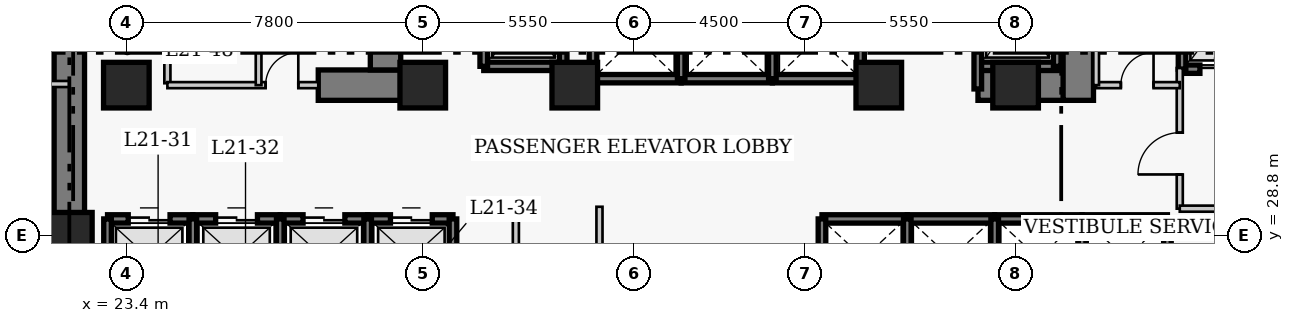
"""IFC4 building model, lengths in metres.
Left out: names, types, materials, properties, quantities, classifications, styles, units other than length and angle.
Written with IfcOpenShell. Run it as: python <this file> out.ifc"""

import sys

from ifc_helpers import new_model, si_unit, direction, frame, frame_2d, origin, origin_2d, place, context, subcontext, project, spatial, rectangle, extrude, element, fill, save


model = new_model("IFC4")
c1 = context("Model", 3, precision=1e-05, world=origin(), true_north=direction((0.0, 1.0)))
c2 = subcontext(c1, "Body", "Model", "MODEL_VIEW")
j1 = project(units=[si_unit("LENGTHUNIT", "METRE"), si_unit("PLANEANGLEUNIT", "RADIAN")], contexts=[c1])
p1 = place(None, origin())
s1 = spatial("IfcSite", under=j1, at=p1, CompositionType="ELEMENT")
p2 = place(p1, origin())
s2 = spatial("IfcBuilding", under=s1, at=p2, CompositionType="ELEMENT")
p3 = place(p2, frame((0.0, 0.0, 88.0)))
s3 = spatial("IfcBuildingStorey", under=s2, at=p3, CompositionType="ELEMENT", Elevation=88.0)
p4 = place(p3, frame((21.9, 27.05, 0.0), z_axis=(0.0, 0.0, 1.0), x_axis=(0.0, 1.0, 0.0)))
e1 = element("IfcWall", 1, at=p4, inside=s3, PredefinedType="SHEAR", context=c2, shape_type="SweptSolid", body=[
    extrude(rectangle(XDim=13.67, YDim=0.8, at=frame_2d((6.835, 0.0))), origin(), (0.0, 0.0, 1.0), 3.8),
])
p5 = place(p3, frame((28.45, 32.75, 0.0), z_axis=(0.0, 0.0, 1.0), x_axis=(1.0, 0.0, 0.0)))
e2 = element("IfcWall", 2, at=p5, inside=s3, PredefinedType="SHEAR", context=c2, shape_type="SweptSolid", body=[
    extrude(rectangle(XDim=2.4, YDim=0.8, at=frame_2d((1.2, 0.0))), origin(), (0.0, 0.0, 1.0), 3.8),
])
p6 = place(p3, frame((45.81, 32.75, 0.0), z_axis=(0.0, 0.0, 1.0), x_axis=(1.0, 0.0, 0.0)))
e3 = element("IfcWall", 3, at=p6, inside=s3, PredefinedType="SHEAR", context=c2, shape_type="SweptSolid", body=[
    extrude(rectangle(XDim=2.64, YDim=0.8, at=frame_2d((1.32, 0.0))), origin(), (0.0, 0.0, 1.0), 3.8),
])
p7 = place(p3, frame((30.22, 33.15, 0.0), z_axis=(0.0, 0.0, 1.0), x_axis=(0.0, 1.0, 0.0)))
e4 = element("IfcWall", 4, at=p7, inside=s3, PredefinedType="SHEAR", context=c2, shape_type="SweptSolid", body=[
    extrude(rectangle(XDim=7.17, YDim=0.8, at=frame_2d((3.585, 0.0))), origin(), (0.0, 0.0, 1.0), 3.8),
])
p8 = place(p3, frame((48.45, 32.35, 0.0), z_axis=(0.0, 0.0, 1.0), x_axis=(0.0, 1.0, 0.0)))
e5 = element("IfcWall", 5, at=p8, inside=s3, PredefinedType="SHEAR", context=c2, shape_type="SweptSolid", body=[
    extrude(rectangle(XDim=7.97, YDim=0.8, at=frame_2d((3.985, 0.0))), origin(), (0.0, 0.0, 1.0), 3.8),
])
p9 = place(p8, frame((5.85, 0.0, 0.0)))
e6 = element("IfcOpeningElement", 6, at=p9, cuts=e5, PredefinedType="OPENING", context=c2, shape_type="SweptSolid", body=[
    extrude(rectangle(XDim=1.1, YDim=2.15, at=frame_2d((0.55, 1.075))), frame((0.0, 0.41, 0.0), z_axis=(0.0, -1.0, 0.0), x_axis=(1.0, 0.0, 0.0)), (0.0, 0.0, 1.0), 0.82),
])
for number, where, z_axis, x_axis in (
    (7, (21.9, 28.8, 0.0), (0.0, 0.0, 1.0), (1.0, 0.0, 0.0)),
    (8, (23.4, 32.75, 0.0), (0.0, 0.0, 1.0), (1.0, 0.0, 0.0)),
    (9, (31.2, 32.75, 0.0), (0.0, 0.0, 1.0), (1.0, 0.0, 0.0)),
    (10, (35.2, 32.75, 0.0), (0.0, 0.0, 1.0), (1.0, 0.0, 0.0)),
    (11, (43.2, 32.75, 0.0), (0.0, 0.0, 1.0), (1.0, 0.0, 0.0)),
    (12, (46.8, 32.75, 0.0), (0.0, 0.0, 1.0), (1.0, 0.0, 0.0)),
):
    element("IfcColumn", number, at=place(p3, frame(where, z_axis=z_axis, x_axis=x_axis)), inside=s3, PredefinedType="COLUMN", context=c2, shape_type="SweptSolid", body=[
        extrude(rectangle(XDim=1.2, YDim=1.2, at=origin_2d()), origin(), (0.0, 0.0, 1.0), 3.8),
    ])
p10 = place(p3, frame((22.905, 29.23, 0.0), z_axis=(0.0, 0.0, 1.0), x_axis=(1.0, 0.0, 0.0)))
e13 = element("IfcWall", 13, at=p10, inside=s3, PredefinedType="SHEAR", context=c2, shape_type="SweptSolid", body=[
    extrude(rectangle(XDim=2.245, YDim=0.22, at=frame_2d((1.123, 0.0))), origin(), (0.0, 0.0, 1.0), 3.8),
])
p11 = place(p10, frame((0.545, 0.0, 0.0)))
e14 = element("IfcOpeningElement", 14, at=p11, cuts=e13, PredefinedType="OPENING", context=c2, shape_type="SweptSolid", body=[
    extrude(rectangle(XDim=1.1, YDim=2.15, at=frame_2d((0.55, 1.075))), frame((0.0, 0.12, 0.0), z_axis=(0.0, -1.0, 0.0), x_axis=(1.0, 0.0, 0.0)), (0.0, 0.0, 1.0), 0.24),
])
p12 = place(p3, frame((22.905, 27.17, 0.0), z_axis=(0.0, 0.0, 1.0), x_axis=(0.0, 1.0, 0.0)))
e15 = element("IfcWall", 15, at=p12, inside=s3, PredefinedType="SHEAR", context=c2, shape_type="SweptSolid", body=[
    extrude(rectangle(XDim=2.06, YDim=0.2, at=frame_2d((1.03, 0.0))), origin(), (0.0, 0.0, 1.0), 3.8),
])
p13 = place(p3, frame((25.15, 29.23, 0.0), z_axis=(0.0, 0.0, 1.0), x_axis=(1.0, 0.0, 0.0)))
e16 = element("IfcWall", 16, at=p13, inside=s3, PredefinedType="SHEAR", context=c2, shape_type="SweptSolid", body=[
    extrude(rectangle(XDim=2.3, YDim=0.22, at=frame_2d((1.15, 0.0))), origin(), (0.0, 0.0, 1.0), 3.8),
])
p14 = place(p13, frame((0.6, 0.0, 0.0)))
e17 = element("IfcOpeningElement", 17, at=p14, cuts=e16, PredefinedType="OPENING", context=c2, shape_type="SweptSolid", body=[
    extrude(rectangle(XDim=1.1, YDim=2.15, at=frame_2d((0.55, 1.075))), frame((0.0, 0.12, 0.0), z_axis=(0.0, -1.0, 0.0), x_axis=(1.0, 0.0, 0.0)), (0.0, 0.0, 1.0), 0.24),
])
p15 = place(p3, frame((25.15, 27.17, 0.0), z_axis=(0.0, 0.0, 1.0), x_axis=(0.0, 1.0, 0.0)))
e18 = element("IfcWall", 18, at=p15, inside=s3, PredefinedType="SHEAR", context=c2, shape_type="SweptSolid", body=[
    extrude(rectangle(XDim=2.06, YDim=0.2, at=frame_2d((1.03, 0.0))), origin(), (0.0, 0.0, 1.0), 3.8),
])
p16 = place(p3, frame((27.45, 29.23, 0.0), z_axis=(0.0, 0.0, 1.0), x_axis=(1.0, 0.0, 0.0)))
e19 = element("IfcWall", 19, at=p16, inside=s3, PredefinedType="SHEAR", context=c2, shape_type="SweptSolid", body=[
    extrude(rectangle(XDim=2.3, YDim=0.22, at=frame_2d((1.15, 0.0))), origin(), (0.0, 0.0, 1.0), 3.8),
])
p17 = place(p16, frame((0.6, 0.0, 0.0)))
e20 = element("IfcOpeningElement", 20, at=p17, cuts=e19, PredefinedType="OPENING", context=c2, shape_type="SweptSolid", body=[
    extrude(rectangle(XDim=1.1, YDim=2.15, at=frame_2d((0.55, 1.075))), frame((0.0, 0.12, 0.0), z_axis=(0.0, -1.0, 0.0), x_axis=(1.0, 0.0, 0.0)), (0.0, 0.0, 1.0), 0.24),
])
p18 = place(p3, frame((27.45, 27.17, 0.0), z_axis=(0.0, 0.0, 1.0), x_axis=(0.0, 1.0, 0.0)))
e21 = element("IfcWall", 21, at=p18, inside=s3, PredefinedType="SHEAR", context=c2, shape_type="SweptSolid", body=[
    extrude(rectangle(XDim=2.06, YDim=0.2, at=frame_2d((1.03, 0.0))), origin(), (0.0, 0.0, 1.0), 3.8),
])
p19 = place(p3, frame((29.75, 29.23, 0.0), z_axis=(0.0, 0.0, 1.0), x_axis=(1.0, 0.0, 0.0)))
e22 = element("IfcWall", 22, at=p19, inside=s3, PredefinedType="SHEAR", context=c2, shape_type="SweptSolid", body=[
    extrude(rectangle(XDim=2.245, YDim=0.22, at=frame_2d((1.123, 0.0))), origin(), (0.0, 0.0, 1.0), 3.8),
])
p20 = place(p19, frame((0.6, 0.0, 0.0)))
e23 = element("IfcOpeningElement", 23, at=p20, cuts=e22, PredefinedType="OPENING", context=c2, shape_type="SweptSolid", body=[
    extrude(rectangle(XDim=1.1, YDim=2.15, at=frame_2d((0.55, 1.075))), frame((0.0, 0.12, 0.0), z_axis=(0.0, -1.0, 0.0), x_axis=(1.0, 0.0, 0.0)), (0.0, 0.0, 1.0), 0.24),
])
for number, where, z_axis, x_axis in (
    (24, (29.75, 27.17, 0.0), (0.0, 0.0, 1.0), (0.0, 1.0, 0.0)),
    (25, (31.995, 27.17, 0.0), (0.0, 0.0, 1.0), (0.0, 1.0, 0.0)),
):
    element("IfcWall", number, at=place(p3, frame(where, z_axis=z_axis, x_axis=x_axis)), inside=s3, PredefinedType="SHEAR", context=c2, shape_type="SweptSolid", body=[
        extrude(rectangle(XDim=2.06, YDim=0.2, at=frame_2d((1.03, 0.0))), origin(), (0.0, 0.0, 1.0), 3.8),
    ])
p21 = place(p3, frame((41.705, 29.23, 0.0), z_axis=(0.0, 0.0, 1.0), x_axis=(1.0, 0.0, 0.0)))
e26 = element("IfcWall", 26, at=p21, inside=s3, PredefinedType="SHEAR", context=c2, shape_type="SweptSolid", body=[
    extrude(rectangle(XDim=2.245, YDim=0.22, at=frame_2d((1.123, 0.0))), origin(), (0.0, 0.0, 1.0), 3.8),
])
p22 = place(p3, frame((41.705, 27.17, 0.0), z_axis=(0.0, 0.0, 1.0), x_axis=(0.0, 1.0, 0.0)))
e27 = element("IfcWall", 27, at=p22, inside=s3, PredefinedType="SHEAR", context=c2, shape_type="SweptSolid", body=[
    extrude(rectangle(XDim=2.06, YDim=0.2, at=frame_2d((1.03, 0.0))), origin(), (0.0, 0.0, 1.0), 3.8),
])
p23 = place(p3, frame((43.95, 29.23, 0.0), z_axis=(0.0, 0.0, 1.0), x_axis=(1.0, 0.0, 0.0)))
e28 = element("IfcWall", 28, at=p23, inside=s3, PredefinedType="SHEAR", context=c2, shape_type="SweptSolid", body=[
    extrude(rectangle(XDim=2.3, YDim=0.22, at=frame_2d((1.15, 0.0))), origin(), (0.0, 0.0, 1.0), 3.8),
])
p24 = place(p3, frame((43.95, 27.17, 0.0), z_axis=(0.0, 0.0, 1.0), x_axis=(0.0, 1.0, 0.0)))
e29 = element("IfcWall", 29, at=p24, inside=s3, PredefinedType="SHEAR", context=c2, shape_type="SweptSolid", body=[
    extrude(rectangle(XDim=2.06, YDim=0.2, at=frame_2d((1.03, 0.0))), origin(), (0.0, 0.0, 1.0), 3.8),
])
p25 = place(p3, frame((46.25, 29.23, 0.0), z_axis=(0.0, 0.0, 1.0), x_axis=(1.0, 0.0, 0.0)))
e30 = element("IfcWall", 30, at=p25, inside=s3, PredefinedType="SHEAR", context=c2, shape_type="SweptSolid", body=[
    extrude(rectangle(XDim=2.3, YDim=0.22, at=frame_2d((1.15, 0.0))), origin(), (0.0, 0.0, 1.0), 3.8),
])
p26 = place(p3, frame((46.25, 27.17, 0.0), z_axis=(0.0, 0.0, 1.0), x_axis=(0.0, 1.0, 0.0)))
e31 = element("IfcWall", 31, at=p26, inside=s3, PredefinedType="SHEAR", context=c2, shape_type="SweptSolid", body=[
    extrude(rectangle(XDim=2.06, YDim=0.2, at=frame_2d((1.03, 0.0))), origin(), (0.0, 0.0, 1.0), 3.8),
])
p27 = place(p3, frame((48.55, 29.23, 0.0), z_axis=(0.0, 0.0, 1.0), x_axis=(1.0, 0.0, 0.0)))
e32 = element("IfcWall", 32, at=p27, inside=s3, PredefinedType="SHEAR", context=c2, shape_type="SweptSolid", body=[
    extrude(rectangle(XDim=2.245, YDim=0.22, at=frame_2d((1.123, 0.0))), origin(), (0.0, 0.0, 1.0), 3.8),
])
for number, where, z_axis, x_axis in (
    (33, (48.55, 27.17, 0.0), (0.0, 0.0, 1.0), (0.0, 1.0, 0.0)),
    (34, (50.795, 27.17, 0.0), (0.0, 0.0, 1.0), (0.0, 1.0, 0.0)),
):
    element("IfcWall", number, at=place(p3, frame(where, z_axis=z_axis, x_axis=x_axis)), inside=s3, PredefinedType="SHEAR", context=c2, shape_type="SweptSolid", body=[
        extrude(rectangle(XDim=2.06, YDim=0.2, at=frame_2d((1.03, 0.0))), origin(), (0.0, 0.0, 1.0), 3.8),
    ])
p28 = place(p3, frame((35.68, 32.92, 0.0), z_axis=(0.0, 0.0, 1.0), x_axis=(1.0, 0.0, 0.0)))
e35 = element("IfcWall", 35, at=p28, inside=s3, PredefinedType="SHEAR", context=c2, shape_type="SweptSolid", body=[
    extrude(rectangle(XDim=2.32, YDim=0.22, at=frame_2d((1.16, 0.0))), origin(), (0.0, 0.0, 1.0), 3.8),
])
p29 = place(p3, frame((35.68, 32.92, 0.0), z_axis=(0.0, 0.0, 1.0), x_axis=(0.0, 1.0, 0.0)))
e36 = element("IfcWall", 36, at=p29, inside=s3, PredefinedType="SHEAR", context=c2, shape_type="SweptSolid", body=[
    extrude(rectangle(XDim=2.16, YDim=0.2, at=frame_2d((1.08, 0.0))), origin(), (0.0, 0.0, 1.0), 3.8),
])
p30 = place(p3, frame((38.0, 32.92, 0.0), z_axis=(0.0, 0.0, 1.0), x_axis=(1.0, 0.0, 0.0)))
e37 = element("IfcWall", 37, at=p30, inside=s3, PredefinedType="SHEAR", context=c2, shape_type="SweptSolid", body=[
    extrude(rectangle(XDim=2.4, YDim=0.22, at=frame_2d((1.2, 0.0))), origin(), (0.0, 0.0, 1.0), 3.8),
])
p31 = place(p3, frame((38.0, 32.92, 0.0), z_axis=(0.0, 0.0, 1.0), x_axis=(0.0, 1.0, 0.0)))
e38 = element("IfcWall", 38, at=p31, inside=s3, PredefinedType="SHEAR", context=c2, shape_type="SweptSolid", body=[
    extrude(rectangle(XDim=2.16, YDim=0.2, at=frame_2d((1.08, 0.0))), origin(), (0.0, 0.0, 1.0), 3.8),
])
p32 = place(p3, frame((40.4, 32.92, 0.0), z_axis=(0.0, 0.0, 1.0), x_axis=(1.0, 0.0, 0.0)))
e39 = element("IfcWall", 39, at=p32, inside=s3, PredefinedType="SHEAR", context=c2, shape_type="SweptSolid", body=[
    extrude(rectangle(XDim=2.32, YDim=0.22, at=frame_2d((1.16, 0.0))), origin(), (0.0, 0.0, 1.0), 3.8),
])
for number, where, z_axis, x_axis in (
    (40, (40.4, 32.92, 0.0), (0.0, 0.0, 1.0), (0.0, 1.0, 0.0)),
    (41, (42.72, 32.92, 0.0), (0.0, 0.0, 1.0), (0.0, 1.0, 0.0)),
):
    element("IfcWall", number, at=place(p3, frame(where, z_axis=z_axis, x_axis=x_axis)), inside=s3, PredefinedType="SHEAR", context=c2, shape_type="SweptSolid", body=[
        extrude(rectangle(XDim=2.16, YDim=0.2, at=frame_2d((1.08, 0.0))), origin(), (0.0, 0.0, 1.0), 3.8),
    ])
p33 = place(p3, frame((51.18, 33.17, 0.0), z_axis=(0.0, 0.0, 1.0), x_axis=(1.0, 0.0, 0.0)))
e42 = element("IfcWall", 42, at=p33, inside=s3, PredefinedType="SHEAR", context=c2, shape_type="SweptSolid", body=[
    extrude(rectangle(XDim=2.42, YDim=0.22, at=frame_2d((1.21, 0.0))), origin(), (0.0, 0.0, 1.0), 3.8),
])
p34 = place(p33, frame((0.47, 0.0, 0.0)))
e43 = element("IfcOpeningElement", 43, at=p34, cuts=e42, PredefinedType="OPENING", context=c2, shape_type="SweptSolid", body=[
    extrude(rectangle(XDim=1.3, YDim=2.15, at=frame_2d((0.65, 1.075))), frame((0.0, 0.12, 0.0), z_axis=(0.0, -1.0, 0.0), x_axis=(1.0, 0.0, 0.0)), (0.0, 0.0, 1.0), 0.24),
])
p35 = place(p3, frame((51.18, 33.17, 0.0), z_axis=(0.0, 0.0, 1.0), x_axis=(0.0, 1.0, 0.0)))
e44 = element("IfcWall", 44, at=p35, inside=s3, PredefinedType="SHEAR", context=c2, shape_type="SweptSolid", body=[
    extrude(rectangle(XDim=2.86, YDim=0.2, at=frame_2d((1.43, 0.0))), origin(), (0.0, 0.0, 1.0), 3.8),
])
p36 = place(p3, frame((32.805, 33.245, 0.0), z_axis=(0.0, 0.0, 1.0), x_axis=(1.0, 0.0, 0.0)))
e45 = element("IfcWall", 45, at=p36, inside=s3, PredefinedType="SHEAR", context=c2, shape_type="SweptSolid", body=[
    extrude(rectangle(XDim=2.09, YDim=0.22, at=frame_2d((1.045, 0.0))), origin(), (0.0, 0.0, 1.0), 3.8),
])
for number, where, z_axis, x_axis in (
    (46, (32.805, 33.245, 0.0), (0.0, 0.0, 1.0), (0.0, 1.0, 0.0)),
    (47, (34.895, 33.245, 0.0), (0.0, 0.0, 1.0), (0.0, 1.0, 0.0)),
):
    element("IfcWall", number, at=place(p3, frame(where, z_axis=z_axis, x_axis=x_axis)), inside=s3, PredefinedType="SHEAR", context=c2, shape_type="SweptSolid", body=[
        extrude(rectangle(XDim=2.91, YDim=0.2, at=frame_2d((1.455, 0.0))), origin(), (0.0, 0.0, 1.0), 3.8),
    ])
p37 = place(p3, frame((45.805, 33.245, 0.0), z_axis=(0.0, 0.0, 1.0), x_axis=(1.0, 0.0, 0.0)))
e48 = element("IfcWall", 48, at=p37, inside=s3, PredefinedType="SHEAR", context=c2, shape_type="SweptSolid", body=[
    extrude(rectangle(XDim=2.09, YDim=0.22, at=frame_2d((1.045, 0.0))), origin(), (0.0, 0.0, 1.0), 3.8),
])
p38 = place(p3, frame((45.805, 32.65, 0.0), z_axis=(0.0, 0.0, 1.0), x_axis=(0.0, 1.0, 0.0)))
e49 = element("IfcWall", 49, at=p38, inside=s3, PredefinedType="SHEAR", context=c2, shape_type="SweptSolid", body=[
    extrude(rectangle(XDim=3.505, YDim=0.2, at=frame_2d((1.752, 0.0))), origin(), (0.0, 0.0, 1.0), 3.8),
])
p39 = place(p3, frame((47.895, 33.245, 0.0), z_axis=(0.0, 0.0, 1.0), x_axis=(0.0, 1.0, 0.0)))
e50 = element("IfcWall", 50, at=p39, inside=s3, PredefinedType="SHEAR", context=c2, shape_type="SweptSolid", body=[
    extrude(rectangle(XDim=2.91, YDim=0.2, at=frame_2d((1.455, 0.0))), origin(), (0.0, 0.0, 1.0), 3.8),
])
p40 = place(p3, frame((24.48, 32.8, 0.0), z_axis=(0.0, 0.0, 1.0), x_axis=(0.0, 1.0, 0.0)))
e51 = element("IfcWall", 51, at=p40, inside=s3, PredefinedType="PARTITIONING", context=c2, shape_type="SweptSolid", body=[
    extrude(rectangle(XDim=3.57, YDim=0.16, at=frame_2d((1.785, 0.0))), origin(), (0.0, 0.0, 1.0), 3.54),
])
p41 = place(p40, frame((1.604, 0.0, 0.0)))
e52 = element("IfcOpeningElement", 52, at=p41, cuts=e51, PredefinedType="OPENING", context=c2, shape_type="SweptSolid", body=[
    extrude(rectangle(XDim=0.9, YDim=2.1, at=frame_2d((0.45, 1.05))), frame((0.0, 0.09, 0.0), z_axis=(0.0, -1.0, 0.0), x_axis=(1.0, 0.0, 0.0)), (0.0, 0.0, 1.0), 0.18),
])
p42 = place(p3, frame((51.12, 29.5, 0.0), z_axis=(0.0, 0.0, 1.0), x_axis=(0.0, 1.0, 0.0)))
e53 = element("IfcWall", 53, at=p42, inside=s3, PredefinedType="PARTITIONING", context=c2, shape_type="SweptSolid", body=[
    extrude(rectangle(XDim=3.7, YDim=0.16, at=frame_2d((1.85, 0.0))), origin(), (0.0, 0.0, 1.0), 3.54),
])
p43 = place(p42, frame((0.9, 0.0, 0.0)))
e54 = element("IfcOpeningElement", 54, at=p43, cuts=e53, PredefinedType="OPENING", context=c2, shape_type="SweptSolid", body=[
    extrude(rectangle(XDim=1.1, YDim=2.15, at=frame_2d((0.55, 1.075))), frame((0.0, 0.09, 0.0), z_axis=(0.0, -1.0, 0.0), x_axis=(1.0, 0.0, 0.0)), (0.0, 0.0, 1.0), 0.18),
])
p44 = place(p3, frame((51.12, 29.5, 0.0), z_axis=(0.0, 0.0, 1.0), x_axis=(1.0, 0.0, 0.0)))
e55 = element("IfcWall", 55, at=p44, inside=s3, PredefinedType="PARTITIONING", context=c2, shape_type="SweptSolid", body=[
    extrude(rectangle(XDim=5.63, YDim=0.16, at=frame_2d((2.815, 0.0))), origin(), (0.0, 0.0, 1.0), 3.54),
])
p45 = place(p3, frame((24.48, 32.75, 0.0), z_axis=(0.0, 0.0, 1.0), x_axis=(1.0, 0.0, 0.0)))
e56 = element("IfcWall", 56, at=p45, inside=s3, PredefinedType="PARTITIONING", context=c2, shape_type="SweptSolid", body=[
    extrude(rectangle(XDim=3.97, YDim=0.16, at=frame_2d((1.985, 0.0))), origin(), (0.0, 0.0, 1.0), 3.54),
])
p46 = place(p45, frame((2.585, 0.0, 0.0)))
e57 = element("IfcOpeningElement", 57, at=p46, cuts=e56, PredefinedType="OPENING", context=c2, shape_type="SweptSolid", body=[
    extrude(rectangle(XDim=0.86, YDim=2.05, at=frame_2d((0.43, 1.025))), frame((0.0, 0.09, 0.0), z_axis=(0.0, -1.0, 0.0), x_axis=(1.0, 0.0, 0.0)), (0.0, 0.0, 1.0), 0.18),
])
p47 = place(p3, frame((48.92, 32.75, 0.0), z_axis=(0.0, 0.0, 1.0), x_axis=(1.0, 0.0, 0.0)))
e58 = element("IfcWall", 58, at=p47, inside=s3, PredefinedType="PARTITIONING", context=c2, shape_type="SweptSolid", body=[
    extrude(rectangle(XDim=2.2, YDim=0.16, at=frame_2d((1.1, 0.0))), origin(), (0.0, 0.0, 1.0), 3.54),
])
p48 = place(p47, frame((0.65, 0.0, 0.0)))
e59 = element("IfcOpeningElement", 59, at=p48, cuts=e58, PredefinedType="OPENING", context=c2, shape_type="SweptSolid", body=[
    extrude(rectangle(XDim=0.86, YDim=2.05, at=frame_2d((0.43, 1.025))), frame((0.0, 0.09, 0.0), z_axis=(0.0, -1.0, 0.0), x_axis=(1.0, 0.0, 0.0)), (0.0, 0.0, 1.0), 0.18),
])
for number, where, z_axis, x_axis in (
    (60, (48.92, 32.75, 0.0), (0.0, 0.0, 1.0), (0.0, 1.0, 0.0)),
    (61, (26.88, 32.75, 0.0), (0.0, 0.0, 1.0), (0.0, 1.0, 0.0)),
):
    element("IfcWall", number, at=place(p3, frame(where, z_axis=z_axis, x_axis=x_axis)), inside=s3, PredefinedType="PARTITIONING", context=c2, shape_type="SweptSolid", body=[
        extrude(rectangle(XDim=3.62, YDim=0.15, at=frame_2d((1.81, 0.0))), origin(), (0.0, 0.0, 1.0), 3.54),
    ])
for number, where, z_axis, x_axis in (
    (62, (33.65, 26.11, 0.0), (0.0, 0.0, 1.0), (0.0, 1.0, 0.0)),
    (63, (35.85, 26.11, 0.0), (0.0, 0.0, 1.0), (0.0, 1.0, 0.0)),
):
    element("IfcWall", number, at=place(p3, frame(where, z_axis=z_axis, x_axis=x_axis)), inside=s3, PredefinedType="PARTITIONING", context=c2, shape_type="SweptSolid", body=[
        extrude(rectangle(XDim=3.44, YDim=0.16, at=frame_2d((1.72, 0.0))), origin(), (0.0, 0.0, 1.0), 3.54),
    ])
p49 = place(p3, frame((18.86, 32.78, 0.0), z_axis=(0.0, 0.0, 1.0), x_axis=(1.0, 0.0, 0.0)))
e64 = element("IfcWall", 64, at=p49, inside=s3, PredefinedType="PARTITIONING", context=c2, shape_type="SweptSolid", body=[
    extrude(rectangle(XDim=3.04, YDim=0.16, at=frame_2d((1.52, 0.0))), origin(), (0.0, 0.0, 1.0), 3.54),
])
p50 = place(p11, origin())
e65 = element("IfcDoor", 65, at=p50, inside=s3, OperationType="DOUBLE_DOOR_SLIDING", PredefinedType="DOOR", context=c2, shape_type="SweptSolid", body=[
    extrude(rectangle(XDim=1.1, YDim=2.15, at=frame_2d((0.55, 1.075))), frame((0.0, 0.025, 0.0), z_axis=(0.0, -1.0, 0.0), x_axis=(1.0, 0.0, 0.0)), (0.0, 0.0, 1.0), 0.05),
])
fill(e14, e65)
p51 = place(p14, origin())
e66 = element("IfcDoor", 66, at=p51, inside=s3, OperationType="DOUBLE_DOOR_SLIDING", PredefinedType="DOOR", context=c2, shape_type="SweptSolid", body=[
    extrude(rectangle(XDim=1.1, YDim=2.15, at=frame_2d((0.55, 1.075))), frame((0.0, 0.025, 0.0), z_axis=(0.0, -1.0, 0.0), x_axis=(1.0, 0.0, 0.0)), (0.0, 0.0, 1.0), 0.05),
])
fill(e17, e66)
p52 = place(p17, origin())
e67 = element("IfcDoor", 67, at=p52, inside=s3, OperationType="DOUBLE_DOOR_SLIDING", PredefinedType="DOOR", context=c2, shape_type="SweptSolid", body=[
    extrude(rectangle(XDim=1.1, YDim=2.15, at=frame_2d((0.55, 1.075))), frame((0.0, 0.025, 0.0), z_axis=(0.0, -1.0, 0.0), x_axis=(1.0, 0.0, 0.0)), (0.0, 0.0, 1.0), 0.05),
])
fill(e20, e67)
p53 = place(p20, origin())
e68 = element("IfcDoor", 68, at=p53, inside=s3, OperationType="DOUBLE_DOOR_SLIDING", PredefinedType="DOOR", context=c2, shape_type="SweptSolid", body=[
    extrude(rectangle(XDim=1.1, YDim=2.15, at=frame_2d((0.55, 1.075))), frame((0.0, 0.025, 0.0), z_axis=(0.0, -1.0, 0.0), x_axis=(1.0, 0.0, 0.0)), (0.0, 0.0, 1.0), 0.05),
])
fill(e23, e68)
p54 = place(p34, origin())
e69 = element("IfcDoor", 69, at=p54, inside=s3, OperationType="DOUBLE_DOOR_SLIDING", PredefinedType="DOOR", context=c2, shape_type="SweptSolid", body=[
    extrude(rectangle(XDim=1.3, YDim=2.15, at=frame_2d((0.65, 1.075))), frame((0.0, 0.025, 0.0), z_axis=(0.0, -1.0, 0.0), x_axis=(1.0, 0.0, 0.0)), (0.0, 0.0, 1.0), 0.05),
])
fill(e43, e69)
p55 = place(p43, origin())
e70 = element("IfcDoor", 70, at=p55, inside=s3, OperationType="SINGLE_SWING_LEFT", PredefinedType="DOOR", context=c2, shape_type="SweptSolid", body=[
    extrude(rectangle(XDim=1.1, YDim=2.15, at=frame_2d((0.55, 1.075))), frame((0.0, 0.025, 0.0), z_axis=(0.0, -1.0, 0.0), x_axis=(1.0, 0.0, 0.0)), (0.0, 0.0, 1.0), 0.05),
])
fill(e54, e70)
p56 = place(p46, origin())
e71 = element("IfcDoor", 71, at=p56, inside=s3, OperationType="SINGLE_SWING_RIGHT", PredefinedType="DOOR", context=c2, shape_type="SweptSolid", body=[
    extrude(rectangle(XDim=0.86, YDim=2.05, at=frame_2d((0.43, 1.025))), frame((0.0, 0.025, 0.0), z_axis=(0.0, -1.0, 0.0), x_axis=(1.0, 0.0, 0.0)), (0.0, 0.0, 1.0), 0.05),
])
fill(e57, e71)
p57 = place(p48, origin())
e72 = element("IfcDoor", 72, at=p57, inside=s3, OperationType="SINGLE_SWING_RIGHT", PredefinedType="DOOR", context=c2, shape_type="SweptSolid", body=[
    extrude(rectangle(XDim=0.86, YDim=2.05, at=frame_2d((0.43, 1.025))), frame((0.0, 0.025, 0.0), z_axis=(0.0, -1.0, 0.0), x_axis=(1.0, 0.0, 0.0)), (0.0, 0.0, 1.0), 0.05),
])
fill(e59, e72)
save(model, sys.argv[1])
